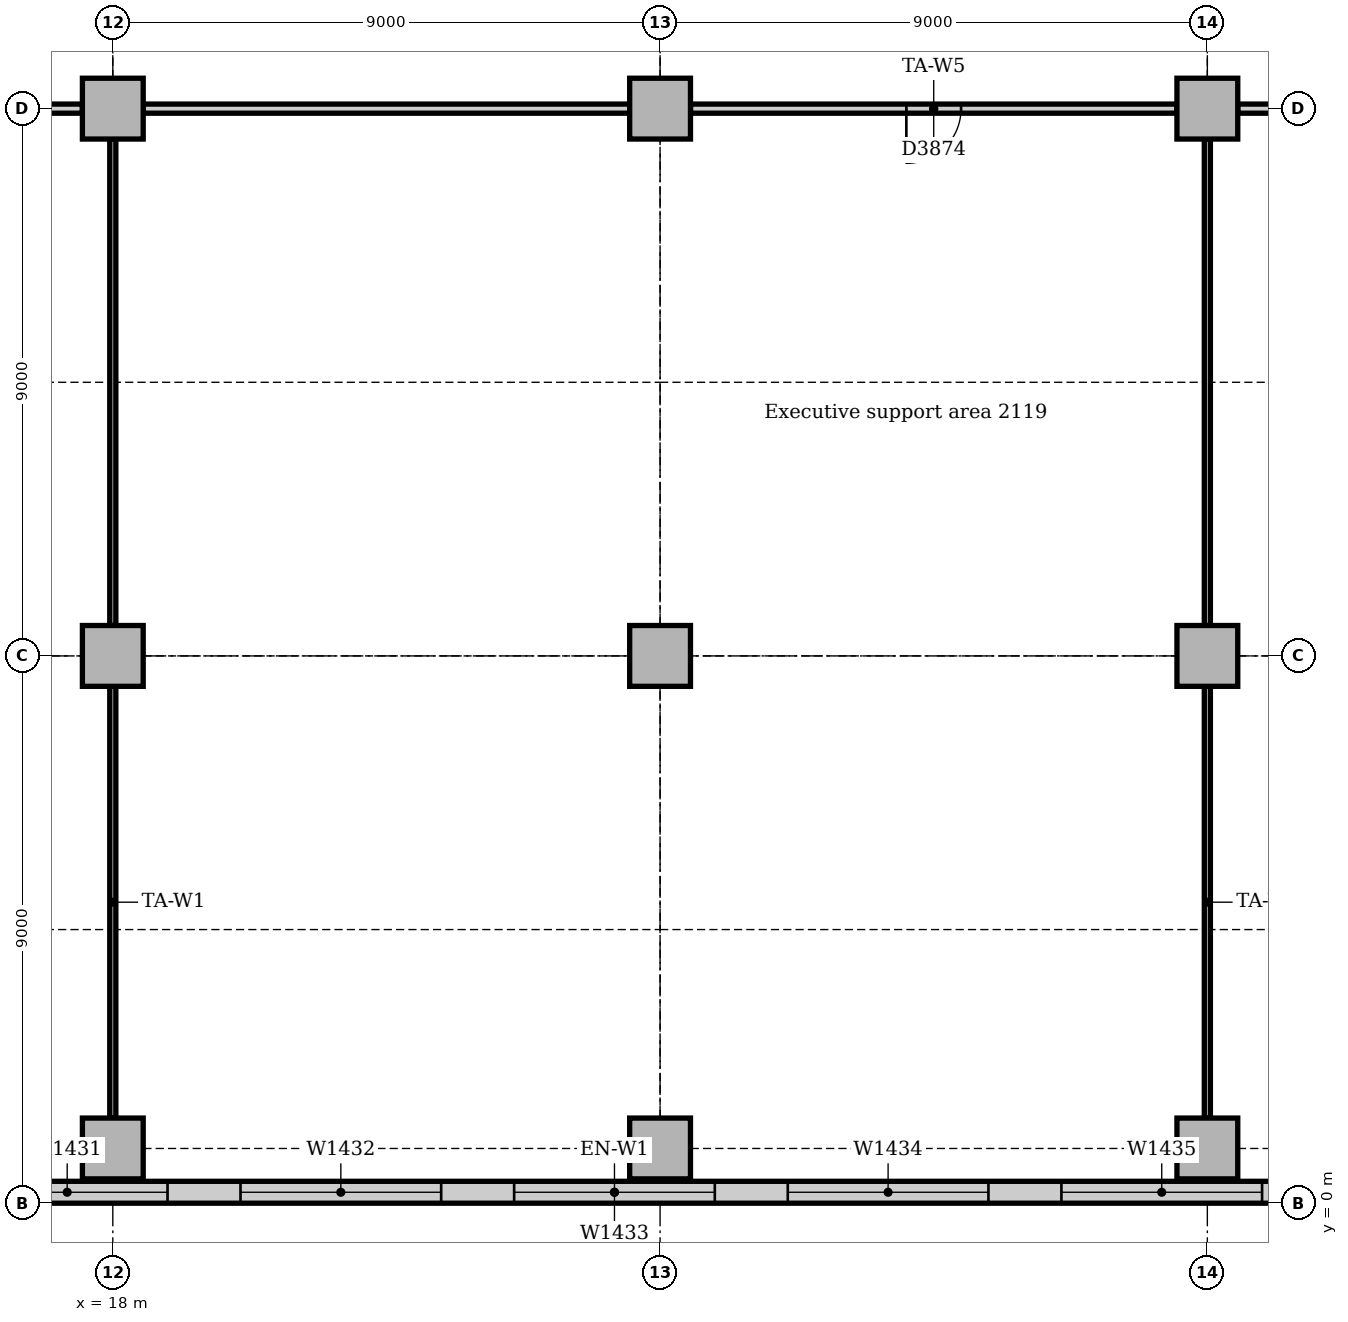
"""IFC4 building model, lengths in metres.
Left out: names, types, materials, properties, quantities, classifications, styles, units other than length and angle.
Written with IfcOpenShell. Run it as: python <this file> out.ifc"""

import sys

from ifc_helpers import new_model, si_unit, direction, frame, frame_2d, origin, origin_2d, place, context, subcontext, project, spatial, rectangle, extrude, element, fill, save


model = new_model("IFC4")
c1 = context("Model", 3, precision=1e-05, world=origin(), true_north=direction((0.0, 1.0)))
c2 = subcontext(c1, "Body", "Model", "MODEL_VIEW")
j1 = project(units=[si_unit("LENGTHUNIT", "METRE"), si_unit("PLANEANGLEUNIT", "RADIAN")], contexts=[c1])
p1 = place(None, origin())
s1 = spatial("IfcSite", under=j1, at=p1, CompositionType="ELEMENT")
p2 = place(p1, origin())
s2 = spatial("IfcBuilding", under=s1, at=p2, CompositionType="ELEMENT")
p3 = place(p2, frame((0.0, 0.0, 91.0)))
s3 = spatial("IfcBuildingStorey", under=s2, at=p3, CompositionType="ELEMENT", Elevation=91.0)
for number, where, z_axis, x_axis in (
    (1, (18.0, 0.9, 0.0), (0.0, 0.0, 1.0), (1.0, 0.0, 0.0)),
    (2, (27.0, 0.9, 0.0), (0.0, 0.0, 1.0), (1.0, 0.0, 0.0)),
    (3, (36.0, 0.9, 0.0), (0.0, 0.0, 1.0), (1.0, 0.0, 0.0)),
    (4, (18.0, 9.0, 0.0), (0.0, 0.0, 1.0), (1.0, 0.0, 0.0)),
    (5, (18.0, 18.0, 0.0), (0.0, 0.0, 1.0), (1.0, 0.0, 0.0)),
    (6, (27.0, 9.0, 0.0), (0.0, 0.0, 1.0), (1.0, 0.0, 0.0)),
    (7, (27.0, 18.0, 0.0), (0.0, 0.0, 1.0), (1.0, 0.0, 0.0)),
    (8, (36.0, 9.0, 0.0), (0.0, 0.0, 1.0), (1.0, 0.0, 0.0)),
    (9, (36.0, 18.0, 0.0), (0.0, 0.0, 1.0), (1.0, 0.0, 0.0)),
):
    element("IfcColumn", number, at=place(p3, frame(where, z_axis=z_axis, x_axis=x_axis)), inside=s3, PredefinedType="COLUMN", context=c2, shape_type="SweptSolid", body=[
        extrude(rectangle(XDim=1.0, YDim=1.0, at=origin_2d()), origin(), (0.0, 0.0, 1.0), 3.7),
    ])
p4 = place(p3, frame((4.243, 0.18, 0.0), z_axis=(0.0, 0.0, 1.0), x_axis=(1.0, 0.0, 0.0)))
e10 = element("IfcWall", 10, at=p4, inside=s3, PredefinedType="STANDARD", context=c2, shape_type="SweptSolid", body=[
    extrude(rectangle(XDim=44.015, YDim=0.36, at=frame_2d((22.007, 0.0))), origin(), (0.0, 0.0, 1.0), 3.7),
])
p5 = place(p4, frame((2.357, 0.0, 0.9)))
e11 = element("IfcOpeningElement", 11, at=p5, cuts=e10, PredefinedType="OPENING", context=c2, shape_type="SweptSolid", body=[
    extrude(rectangle(XDim=3.3, YDim=1.6, at=frame_2d((1.65, 0.8))), frame((0.0, 0.19, 0.0), z_axis=(0.0, -1.0, 0.0), x_axis=(1.0, 0.0, 0.0)), (0.0, 0.0, 1.0), 0.38),
])
p6 = place(p4, frame((6.857, 0.0, 0.9)))
e12 = element("IfcOpeningElement", 12, at=p6, cuts=e10, PredefinedType="OPENING", context=c2, shape_type="SweptSolid", body=[
    extrude(rectangle(XDim=3.3, YDim=1.6, at=frame_2d((1.65, 0.8))), frame((0.0, 0.19, 0.0), z_axis=(0.0, -1.0, 0.0), x_axis=(1.0, 0.0, 0.0)), (0.0, 0.0, 1.0), 0.38),
])
p7 = place(p4, frame((11.357, 0.0, 0.9)))
e13 = element("IfcOpeningElement", 13, at=p7, cuts=e10, PredefinedType="OPENING", context=c2, shape_type="SweptSolid", body=[
    extrude(rectangle(XDim=3.3, YDim=1.6, at=frame_2d((1.65, 0.8))), frame((0.0, 0.19, 0.0), z_axis=(0.0, -1.0, 0.0), x_axis=(1.0, 0.0, 0.0)), (0.0, 0.0, 1.0), 0.38),
])
p8 = place(p4, frame((15.857, 0.0, 0.9)))
e14 = element("IfcOpeningElement", 14, at=p8, cuts=e10, PredefinedType="OPENING", context=c2, shape_type="SweptSolid", body=[
    extrude(rectangle(XDim=3.3, YDim=1.6, at=frame_2d((1.65, 0.8))), frame((0.0, 0.19, 0.0), z_axis=(0.0, -1.0, 0.0), x_axis=(1.0, 0.0, 0.0)), (0.0, 0.0, 1.0), 0.38),
])
p9 = place(p4, frame((20.357, 0.0, 0.9)))
e15 = element("IfcOpeningElement", 15, at=p9, cuts=e10, PredefinedType="OPENING", context=c2, shape_type="SweptSolid", body=[
    extrude(rectangle(XDim=3.3, YDim=1.6, at=frame_2d((1.65, 0.8))), frame((0.0, 0.19, 0.0), z_axis=(0.0, -1.0, 0.0), x_axis=(1.0, 0.0, 0.0)), (0.0, 0.0, 1.0), 0.38),
])
p10 = place(p4, frame((24.857, 0.0, 0.9)))
e16 = element("IfcOpeningElement", 16, at=p10, cuts=e10, PredefinedType="OPENING", context=c2, shape_type="SweptSolid", body=[
    extrude(rectangle(XDim=3.3, YDim=1.6, at=frame_2d((1.65, 0.8))), frame((0.0, 0.19, 0.0), z_axis=(0.0, -1.0, 0.0), x_axis=(1.0, 0.0, 0.0)), (0.0, 0.0, 1.0), 0.38),
])
p11 = place(p4, frame((29.357, 0.0, 0.9)))
e17 = element("IfcOpeningElement", 17, at=p11, cuts=e10, PredefinedType="OPENING", context=c2, shape_type="SweptSolid", body=[
    extrude(rectangle(XDim=3.3, YDim=1.6, at=frame_2d((1.65, 0.8))), frame((0.0, 0.19, 0.0), z_axis=(0.0, -1.0, 0.0), x_axis=(1.0, 0.0, 0.0)), (0.0, 0.0, 1.0), 0.38),
])
p12 = place(p4, frame((33.857, 0.0, 0.9)))
e18 = element("IfcOpeningElement", 18, at=p12, cuts=e10, PredefinedType="OPENING", context=c2, shape_type="SweptSolid", body=[
    extrude(rectangle(XDim=3.3, YDim=1.6, at=frame_2d((1.65, 0.8))), frame((0.0, 0.19, 0.0), z_axis=(0.0, -1.0, 0.0), x_axis=(1.0, 0.0, 0.0)), (0.0, 0.0, 1.0), 0.38),
])
p13 = place(p4, frame((38.357, 0.0, 0.9)))
e19 = element("IfcOpeningElement", 19, at=p13, cuts=e10, PredefinedType="OPENING", context=c2, shape_type="SweptSolid", body=[
    extrude(rectangle(XDim=3.3, YDim=1.6, at=frame_2d((1.65, 0.8))), frame((0.0, 0.19, 0.0), z_axis=(0.0, -1.0, 0.0), x_axis=(1.0, 0.0, 0.0)), (0.0, 0.0, 1.0), 0.38),
])
p14 = place(p3, frame((36.5, 18.0, 0.0), z_axis=(0.0, 0.0, 1.0), x_axis=(1.0, 0.0, 0.0)))
e20 = element("IfcWall", 20, at=p14, inside=s3, PredefinedType="PARTITIONING", context=c2, shape_type="SweptSolid", body=[
    extrude(rectangle(XDim=8.0, YDim=0.15, at=frame_2d((4.0, 0.0))), origin(), (0.0, 0.0, 1.0), 3.0),
])
p15 = place(p3, frame((27.5, 18.0, 0.0), z_axis=(0.0, 0.0, 1.0), x_axis=(1.0, 0.0, 0.0)))
e21 = element("IfcWall", 21, at=p15, inside=s3, PredefinedType="PARTITIONING", context=c2, shape_type="SweptSolid", body=[
    extrude(rectangle(XDim=8.0, YDim=0.15, at=frame_2d((4.0, 0.0))), origin(), (0.0, 0.0, 1.0), 3.0),
])
p16 = place(p15, frame((3.55, 0.0, 0.0)))
e22 = element("IfcOpeningElement", 22, at=p16, cuts=e21, PredefinedType="OPENING", context=c2, shape_type="SweptSolid", body=[
    extrude(rectangle(XDim=0.9, YDim=2.1, at=frame_2d((0.45, 1.05))), frame((0.0, 0.085, 0.0), z_axis=(0.0, -1.0, 0.0), x_axis=(1.0, 0.0, 0.0)), (0.0, 0.0, 1.0), 0.17),
])
p17 = place(p3, frame((18.5, 18.0, 0.0), z_axis=(0.0, 0.0, 1.0), x_axis=(1.0, 0.0, 0.0)))
e23 = element("IfcWall", 23, at=p17, inside=s3, PredefinedType="PARTITIONING", context=c2, shape_type="SweptSolid", body=[
    extrude(rectangle(XDim=8.0, YDim=0.15, at=frame_2d((4.0, 0.0))), origin(), (0.0, 0.0, 1.0), 3.0),
])
p18 = place(p3, frame((9.5, 18.0, 0.0), z_axis=(0.0, 0.0, 1.0), x_axis=(1.0, 0.0, 0.0)))
e24 = element("IfcWall", 24, at=p18, inside=s3, PredefinedType="PARTITIONING", context=c2, shape_type="SweptSolid", body=[
    extrude(rectangle(XDim=8.0, YDim=0.15, at=frame_2d((4.0, 0.0))), origin(), (0.0, 0.0, 1.0), 3.0),
])
p19 = place(p18, frame((3.55, 0.0, 0.0)))
e25 = element("IfcOpeningElement", 25, at=p19, cuts=e24, PredefinedType="OPENING", context=c2, shape_type="SweptSolid", body=[
    extrude(rectangle(XDim=0.9, YDim=2.1, at=frame_2d((0.45, 1.05))), frame((0.0, 0.085, 0.0), z_axis=(0.0, -1.0, 0.0), x_axis=(1.0, 0.0, 0.0)), (0.0, 0.0, 1.0), 0.17),
])
p20 = place(p3, frame((18.0, 1.4, 0.0), z_axis=(0.0, 0.0, 1.0), x_axis=(0.0, 1.0, 0.0)))
e26 = element("IfcWall", 26, at=p20, inside=s3, PredefinedType="PARTITIONING", context=c2, shape_type="SweptSolid", body=[
    extrude(rectangle(XDim=7.1, YDim=0.1, at=frame_2d((3.55, 0.0))), origin(), (0.0, 0.0, 1.0), 3.008),
])
p21 = place(p3, frame((18.0, 9.5, 0.0), z_axis=(0.0, 0.0, 1.0), x_axis=(0.0, 1.0, 0.0)))
e27 = element("IfcWall", 27, at=p21, inside=s3, PredefinedType="PARTITIONING", context=c2, shape_type="SweptSolid", body=[
    extrude(rectangle(XDim=8.0, YDim=0.1, at=frame_2d((4.0, 0.0))), origin(), (0.0, 0.0, 1.0), 3.008),
])
p22 = place(p3, frame((36.0, 1.4, 0.0), z_axis=(0.0, 0.0, 1.0), x_axis=(0.0, 1.0, 0.0)))
e28 = element("IfcWall", 28, at=p22, inside=s3, PredefinedType="PARTITIONING", context=c2, shape_type="SweptSolid", body=[
    extrude(rectangle(XDim=7.1, YDim=0.1, at=frame_2d((3.55, 0.0))), origin(), (0.0, 0.0, 1.0), 3.008),
])
p23 = place(p3, frame((36.0, 9.5, 0.0), z_axis=(0.0, 0.0, 1.0), x_axis=(0.0, 1.0, 0.0)))
e29 = element("IfcWall", 29, at=p23, inside=s3, PredefinedType="PARTITIONING", context=c2, shape_type="SweptSolid", body=[
    extrude(rectangle(XDim=8.0, YDim=0.1, at=frame_2d((4.0, 0.0))), origin(), (0.0, 0.0, 1.0), 3.008),
])
p24 = place(p7, origin())
e30 = element("IfcWindow", 30, at=p24, inside=s3, PartitioningType="SINGLE_PANEL", PredefinedType="WINDOW", context=c2, shape_type="SweptSolid", body=[
    extrude(rectangle(XDim=3.3, YDim=1.6, at=frame_2d((1.65, 0.8))), frame((0.0, 0.13, 0.0), z_axis=(0.0, -1.0, 0.0), x_axis=(1.0, 0.0, 0.0)), (0.0, 0.0, 1.0), 0.06),
])
fill(e13, e30)
p25 = place(p8, origin())
e31 = element("IfcWindow", 31, at=p25, inside=s3, PartitioningType="SINGLE_PANEL", PredefinedType="WINDOW", context=c2, shape_type="SweptSolid", body=[
    extrude(rectangle(XDim=3.3, YDim=1.6, at=frame_2d((1.65, 0.8))), frame((0.0, 0.13, 0.0), z_axis=(0.0, -1.0, 0.0), x_axis=(1.0, 0.0, 0.0)), (0.0, 0.0, 1.0), 0.06),
])
fill(e14, e31)
p26 = place(p9, origin())
e32 = element("IfcWindow", 32, at=p26, inside=s3, PartitioningType="SINGLE_PANEL", PredefinedType="WINDOW", context=c2, shape_type="SweptSolid", body=[
    extrude(rectangle(XDim=3.3, YDim=1.6, at=frame_2d((1.65, 0.8))), frame((0.0, 0.13, 0.0), z_axis=(0.0, -1.0, 0.0), x_axis=(1.0, 0.0, 0.0)), (0.0, 0.0, 1.0), 0.06),
])
fill(e15, e32)
p27 = place(p10, origin())
e33 = element("IfcWindow", 33, at=p27, inside=s3, PartitioningType="SINGLE_PANEL", PredefinedType="WINDOW", context=c2, shape_type="SweptSolid", body=[
    extrude(rectangle(XDim=3.3, YDim=1.6, at=frame_2d((1.65, 0.8))), frame((0.0, 0.13, 0.0), z_axis=(0.0, -1.0, 0.0), x_axis=(1.0, 0.0, 0.0)), (0.0, 0.0, 1.0), 0.06),
])
fill(e16, e33)
p28 = place(p11, origin())
e34 = element("IfcWindow", 34, at=p28, inside=s3, PartitioningType="SINGLE_PANEL", PredefinedType="WINDOW", context=c2, shape_type="SweptSolid", body=[
    extrude(rectangle(XDim=3.3, YDim=1.6, at=frame_2d((1.65, 0.8))), frame((0.0, 0.13, 0.0), z_axis=(0.0, -1.0, 0.0), x_axis=(1.0, 0.0, 0.0)), (0.0, 0.0, 1.0), 0.06),
])
fill(e17, e34)
p29 = place(p16, frame((0.9, 0.0, 0.0), z_axis=(0.0, 0.0, 1.0), x_axis=(-1.0, 0.0, 0.0)))
e35 = element("IfcDoor", 35, at=p29, inside=s3, OperationType="SINGLE_SWING_RIGHT", PredefinedType="DOOR", context=c2, shape_type="SweptSolid", body=[
    extrude(rectangle(XDim=0.9, YDim=2.1, at=frame_2d((0.45, 1.05))), frame((0.0, 0.025, 0.0), z_axis=(0.0, -1.0, 0.0), x_axis=(1.0, 0.0, 0.0)), (0.0, 0.0, 1.0), 0.05),
])
fill(e22, e35)
save(model, sys.argv[1])
